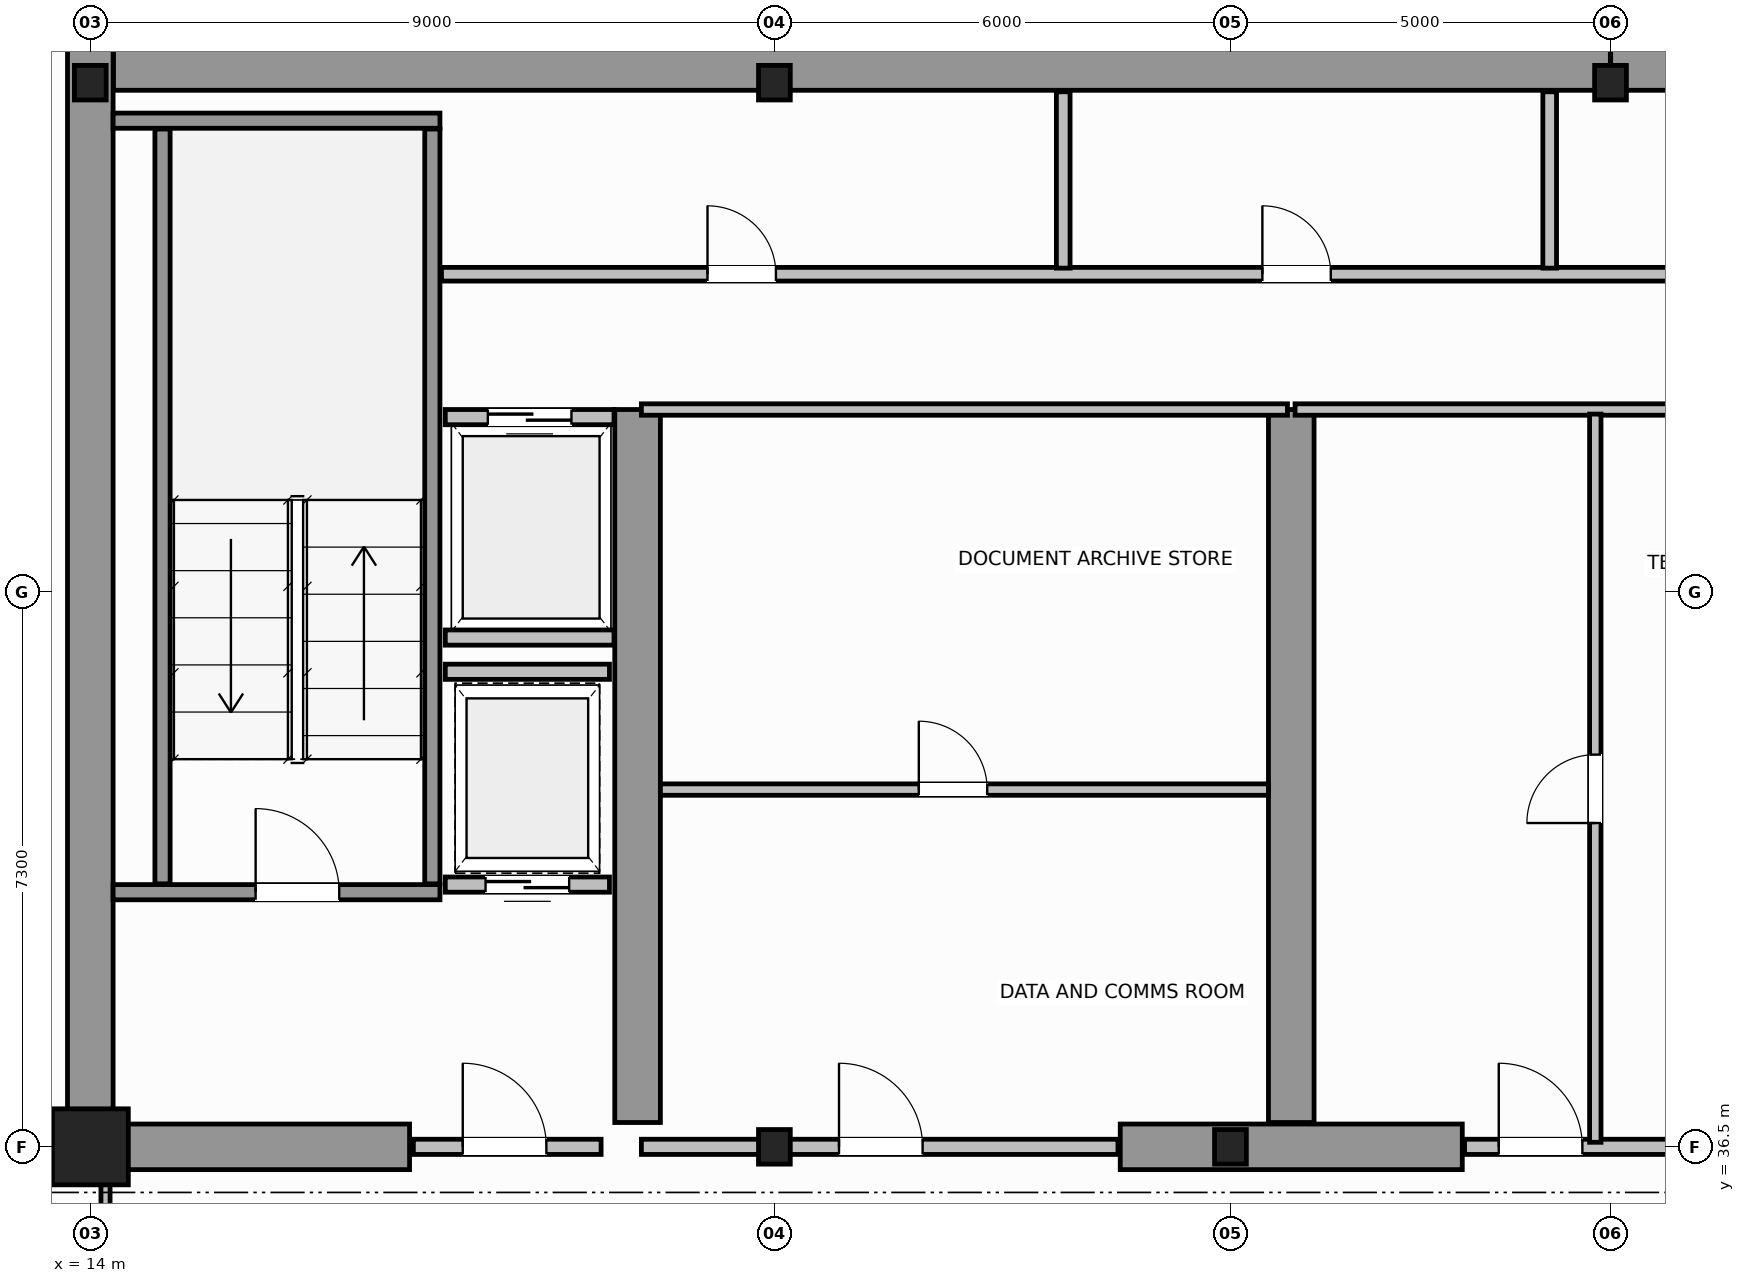
"""IFC4 building model, lengths in metres.
Left out: names, types, materials, properties, quantities, classifications, styles, units other than length and angle.
Written with IfcOpenShell. Run it as: python <this file> out.ifc"""

import sys

from ifc_helpers import new_model, si_unit, direction, frame, frame_2d, origin, origin_2d, place, context, subcontext, project, spatial, rectangle, i_section, extrude, source, transform, mapped, element, fill, save


model = new_model("IFC4")
c1 = context("Model", 3, precision=1e-05, world=origin(), true_north=direction((0.0, 1.0)))
c2 = subcontext(c1, "Body", "Model", "MODEL_VIEW")
j1 = project(units=[si_unit("LENGTHUNIT", "METRE"), si_unit("PLANEANGLEUNIT", "RADIAN")], contexts=[c1])
p1 = place(None, origin())
s1 = spatial("IfcSite", under=j1, at=p1, CompositionType="ELEMENT")
p2 = place(p1, origin())
s2 = spatial("IfcBuilding", under=s1, at=p2, CompositionType="ELEMENT")
p3 = place(p2, frame((0.0, 0.0, 227.0)))
s3 = spatial("IfcBuildingStorey", under=s2, at=p3, CompositionType="ELEMENT", Elevation=227.0)
m1 = source(origin(), c2, "Body", "SweptSolid", [
    extrude(rectangle(XDim=1.0, YDim=1.0, at=origin_2d()), origin(), (0.0, 0.0, 1.0), 3.8),
])
p4 = place(p3, frame((14.0, 36.5, 0.0), z_axis=(0.0, 0.0, 1.0), x_axis=(1.0, 0.0, 0.0)))
e1 = element("IfcColumn", 1, at=p4, inside=s3, PredefinedType="COLUMN", context=c2, shape_type="MappedRepresentation", body=[
    mapped(m1, transform((0.0, 0.0, 0.0), scale=1.0)),
])
m2 = source(origin(), c2, "Body", "SweptSolid", [
    extrude(i_section(OverallWidth=0.418, OverallDepth=0.455, WebThickness=0.042, FlangeThickness=0.058, FilletRadius=0.015, at=origin_2d()), origin(), (0.0, 0.0, 1.0), 3.8),
])
for number, where, z_axis, x_axis in (
    (2, (23.0, 36.5, 0.0), (0.0, 0.0, 1.0), (1.0, 0.0, 0.0)),
    (3, (29.0, 36.5, 0.0), (0.0, 0.0, 1.0), (1.0, 0.0, 0.0)),
    (4, (14.0, 50.5, 0.0), (0.0, 0.0, 1.0), (1.0, 0.0, 0.0)),
    (5, (23.0, 50.5, 0.0), (0.0, 0.0, 1.0), (1.0, 0.0, 0.0)),
    (6, (34.0, 50.5, 0.0), (0.0, 0.0, 1.0), (1.0, 0.0, 0.0)),
):
    element("IfcColumn", number, at=place(p3, frame(where, z_axis=z_axis, x_axis=x_axis)), inside=s3, PredefinedType="COLUMN", context=c2, shape_type="MappedRepresentation", body=[
        mapped(m2, transform((0.0, 0.0, 0.0), scale=1.0)),
    ])
for number, where, z_axis, x_axis in (
    (7, (14.304, 50.7, 0.0), (0.0, 0.0, 1.0), (1.0, 0.0, 0.0)),
    (8, (34.002, 50.7, 0.0), (0.0, 0.0, 1.0), (1.0, 0.0, 0.0)),
):
    element("IfcWall", number, at=place(p3, frame(where, z_axis=z_axis, x_axis=x_axis)), inside=s3, PredefinedType="SHEAR", context=c2, shape_type="SweptSolid", body=[
        extrude(rectangle(XDim=19.694, YDim=0.6, at=frame_2d((9.847, 0.0))), origin(), (0.0, 0.0, 1.0), 3.8),
    ])
p5 = place(p3, frame((14.0, 36.5, 0.0), z_axis=(0.0, 0.0, 1.0), x_axis=(0.0, 1.0, 0.0)))
e9 = element("IfcWall", 9, at=p5, inside=s3, PredefinedType="SHEAR", context=c2, shape_type="SweptSolid", body=[
    extrude(rectangle(XDim=14.5, YDim=0.6, at=frame_2d((7.25, 0.0))), origin(), (0.0, 0.0, 1.0), 3.8),
])
p6 = place(p3, frame((14.32, 36.5, 0.0), z_axis=(0.0, 0.0, 1.0), x_axis=(1.0, 0.0, 0.0)))
e10 = element("IfcWall", 10, at=p6, inside=s3, PredefinedType="SHEAR", context=c2, shape_type="SweptSolid", body=[
    extrude(rectangle(XDim=3.88, YDim=0.6, at=frame_2d((1.94, 0.0))), origin(), (0.0, 0.0, 1.0), 2.58),
])
p7 = place(p3, frame((27.55, 36.5, 0.0), z_axis=(0.0, 0.0, 1.0), x_axis=(1.0, 0.0, 0.0)))
e11 = element("IfcWall", 11, at=p7, inside=s3, PredefinedType="SHEAR", context=c2, shape_type="SweptSolid", body=[
    extrude(rectangle(XDim=4.5, YDim=0.6, at=frame_2d((2.25, 0.0))), origin(), (0.0, 0.0, 1.0), 3.8),
])
for number, where, z_axis, x_axis in (
    (12, (21.2, 36.82, 0.0), (0.0, 0.0, 1.0), (0.0, 1.0, 0.0)),
    (13, (29.8, 36.82, 0.0), (0.0, 0.0, 1.0), (0.0, 1.0, 0.0)),
):
    element("IfcWall", number, at=place(p3, frame(where, z_axis=z_axis, x_axis=x_axis)), inside=s3, PredefinedType="SHEAR", context=c2, shape_type="SweptSolid", body=[
        extrude(rectangle(XDim=9.38, YDim=0.6, at=frame_2d((4.69, 0.0))), origin(), (0.0, 0.0, 1.0), 3.8),
    ])
p8 = place(p3, frame((14.3, 39.85, 0.0), z_axis=(0.0, 0.0, 1.0), x_axis=(1.0, 0.0, 0.0)))
e14 = element("IfcWall", 14, at=p8, inside=s3, PredefinedType="SOLIDWALL", context=c2, shape_type="SweptSolid", body=[
    extrude(rectangle(XDim=4.3, YDim=0.2, at=frame_2d((2.15, 0.0))), origin(), (0.0, 0.0, 1.0), 3.8),
])
p9 = place(p8, frame((1.875, 0.0, 0.0)))
e15 = element("IfcOpeningElement", 15, at=p9, cuts=e14, PredefinedType="OPENING", context=c2, shape_type="SweptSolid", body=[
    extrude(rectangle(XDim=1.1, YDim=2.15, at=frame_2d((0.55, 1.075))), frame((0.0, 0.11, 0.0), z_axis=(0.0, -1.0, 0.0), x_axis=(1.0, 0.0, 0.0)), (0.0, 0.0, 1.0), 0.22),
])
p10 = place(p3, frame((14.3, 50.0, 0.0), z_axis=(0.0, 0.0, 1.0), x_axis=(1.0, 0.0, 0.0)))
e16 = element("IfcWall", 16, at=p10, inside=s3, PredefinedType="SOLIDWALL", context=c2, shape_type="SweptSolid", body=[
    extrude(rectangle(XDim=4.3, YDim=0.2, at=frame_2d((2.15, 0.0))), origin(), (0.0, 0.0, 1.0), 3.8),
])
for number, where, z_axis, x_axis in (
    (17, (14.95, 39.96, 0.0), (0.0, 0.0, 1.0), (0.0, 1.0, 0.0)),
    (18, (18.5, 39.96, 0.0), (0.0, 0.0, 1.0), (0.0, 1.0, 0.0)),
):
    element("IfcWall", number, at=place(p3, frame(where, z_axis=z_axis, x_axis=x_axis)), inside=s3, PredefinedType="SOLIDWALL", context=c2, shape_type="SweptSolid", body=[
        extrude(rectangle(XDim=9.93, YDim=0.2, at=frame_2d((4.965, 0.0))), origin(), (0.0, 0.0, 1.0), 3.8),
    ])
p11 = place(p3, frame((18.25, 36.5, 0.0), z_axis=(0.0, 0.0, 1.0), x_axis=(1.0, 0.0, 0.0)))
e19 = element("IfcWall", 19, at=p11, inside=s3, PredefinedType="SOLIDWALL", context=c2, shape_type="SweptSolid", body=[
    extrude(rectangle(XDim=2.47, YDim=0.2, at=frame_2d((1.235, 0.0))), origin(), (0.0, 0.0, 1.0), 2.57),
])
p12 = place(p11, frame((0.65, 0.0, 0.0)))
e20 = element("IfcOpeningElement", 20, at=p12, cuts=e19, PredefinedType="OPENING", context=c2, shape_type="SweptSolid", body=[
    extrude(rectangle(XDim=1.1, YDim=2.15, at=frame_2d((0.55, 1.075))), frame((0.0, 0.11, 0.0), z_axis=(0.0, -1.0, 0.0), x_axis=(1.0, 0.0, 0.0)), (0.0, 0.0, 1.0), 0.22),
])
p13 = place(p3, frame((18.67, 46.1, 0.0), z_axis=(0.0, 0.0, 1.0), x_axis=(1.0, 0.0, 0.0)))
e21 = element("IfcWall", 21, at=p13, inside=s3, PredefinedType="SOLIDWALL", context=c2, shape_type="SweptSolid", body=[
    extrude(rectangle(XDim=2.22, YDim=0.2, at=frame_2d((1.11, 0.0))), origin(), (0.0, 0.0, 1.0), 3.58),
])
p14 = place(p13, frame((0.56, 0.0, 0.0)))
e22 = element("IfcOpeningElement", 22, at=p14, cuts=e21, PredefinedType="OPENING", context=c2, shape_type="SweptSolid", body=[
    extrude(rectangle(XDim=1.1, YDim=2.15, at=frame_2d((0.55, 1.075))), frame((0.0, 0.11, 0.0), z_axis=(0.0, -1.0, 0.0), x_axis=(1.0, 0.0, 0.0)), (0.0, 0.0, 1.0), 0.22),
])
p15 = place(p3, frame((18.67, 43.2, 0.0), z_axis=(0.0, 0.0, 1.0), x_axis=(1.0, 0.0, 0.0)))
e23 = element("IfcWall", 23, at=p15, inside=s3, PredefinedType="SOLIDWALL", context=c2, shape_type="SweptSolid", body=[
    extrude(rectangle(XDim=2.22, YDim=0.2, at=frame_2d((1.11, 0.0))), origin(), (0.0, 0.0, 1.0), 3.58),
])
p16 = place(p3, frame((18.67, 39.95, 0.0), z_axis=(0.0, 0.0, 1.0), x_axis=(1.0, 0.0, 0.0)))
e24 = element("IfcWall", 24, at=p16, inside=s3, PredefinedType="SOLIDWALL", context=c2, shape_type="SweptSolid", body=[
    extrude(rectangle(XDim=2.16, YDim=0.2, at=frame_2d((1.08, 0.0))), origin(), (0.0, 0.0, 1.0), 3.58),
])
p17 = place(p16, frame((0.53, 0.0, 0.0)))
e25 = element("IfcOpeningElement", 25, at=p17, cuts=e24, PredefinedType="OPENING", context=c2, shape_type="SweptSolid", body=[
    extrude(rectangle(XDim=1.1, YDim=2.15, at=frame_2d((0.55, 1.075))), frame((0.0, 0.11, 0.0), z_axis=(0.0, -1.0, 0.0), x_axis=(1.0, 0.0, 0.0)), (0.0, 0.0, 1.0), 0.22),
])
p18 = place(p3, frame((18.67, 42.75, 0.0), z_axis=(0.0, 0.0, 1.0), x_axis=(1.0, 0.0, 0.0)))
e26 = element("IfcWall", 26, at=p18, inside=s3, PredefinedType="SOLIDWALL", context=c2, shape_type="SweptSolid", body=[
    extrude(rectangle(XDim=2.16, YDim=0.2, at=frame_2d((1.08, 0.0))), origin(), (0.0, 0.0, 1.0), 3.58),
])
p19 = place(p3, frame((21.25, 36.5, 0.0), z_axis=(0.0, 0.0, 1.0), x_axis=(1.0, 0.0, 0.0)))
e27 = element("IfcWall", 27, at=p19, inside=s3, PredefinedType="SOLIDWALL", context=c2, shape_type="SweptSolid", body=[
    extrude(rectangle(XDim=6.27, YDim=0.2, at=frame_2d((3.135, 0.0))), origin(), (0.0, 0.0, 1.0), 2.57),
])
p20 = place(p19, frame((2.6, 0.0, 0.0)))
e28 = element("IfcOpeningElement", 28, at=p20, cuts=e27, PredefinedType="OPENING", context=c2, shape_type="SweptSolid", body=[
    extrude(rectangle(XDim=1.1, YDim=2.15, at=frame_2d((0.55, 1.075))), frame((0.0, 0.11, 0.0), z_axis=(0.0, -1.0, 0.0), x_axis=(1.0, 0.0, 0.0)), (0.0, 0.0, 1.0), 0.22),
])
p21 = place(p3, frame((21.25, 46.2, 0.0), z_axis=(0.0, 0.0, 1.0), x_axis=(1.0, 0.0, 0.0)))
e29 = element("IfcWall", 29, at=p21, inside=s3, PredefinedType="PARTITIONING", context=c2, shape_type="SweptSolid", body=[
    extrude(rectangle(XDim=8.5, YDim=0.15, at=frame_2d((4.25, 0.0))), origin(), (0.0, 0.0, 1.0), 3.58),
])
p22 = place(p3, frame((21.5, 41.2, 0.0), z_axis=(0.0, 0.0, 1.0), x_axis=(1.0, 0.0, 0.0)))
e30 = element("IfcWall", 30, at=p22, inside=s3, PredefinedType="PARTITIONING", context=c2, shape_type="SweptSolid", body=[
    extrude(rectangle(XDim=8.0, YDim=0.15, at=frame_2d((4.0, 0.0))), origin(), (0.0, 0.0, 1.0), 3.58),
])
p23 = place(p22, frame((3.4, 0.0, 0.0)))
e31 = element("IfcOpeningElement", 31, at=p23, cuts=e30, PredefinedType="OPENING", context=c2, shape_type="SweptSolid", body=[
    extrude(rectangle(XDim=0.9, YDim=2.1, at=frame_2d((0.45, 1.05))), frame((0.0, 0.085, 0.0), z_axis=(0.0, -1.0, 0.0), x_axis=(1.0, 0.0, 0.0)), (0.0, 0.0, 1.0), 0.17),
])
p24 = place(p3, frame((32.08, 36.5, 0.0), z_axis=(0.0, 0.0, 1.0), x_axis=(1.0, 0.0, 0.0)))
e32 = element("IfcWall", 32, at=p24, inside=s3, PredefinedType="SOLIDWALL", context=c2, shape_type="SweptSolid", body=[
    extrude(rectangle(XDim=4.04, YDim=0.2, at=frame_2d((2.02, 0.0))), origin(), (0.0, 0.0, 1.0), 3.02),
])
p25 = place(p24, frame((0.45, 0.0, 0.0)))
e33 = element("IfcOpeningElement", 33, at=p25, cuts=e32, PredefinedType="OPENING", context=c2, shape_type="SweptSolid", body=[
    extrude(rectangle(XDim=1.1, YDim=2.15, at=frame_2d((0.55, 1.075))), frame((0.0, 0.11, 0.0), z_axis=(0.0, -1.0, 0.0), x_axis=(1.0, 0.0, 0.0)), (0.0, 0.0, 1.0), 0.22),
])
p26 = place(p3, frame((29.85, 46.2, 0.0), z_axis=(0.0, 0.0, 1.0), x_axis=(1.0, 0.0, 0.0)))
e34 = element("IfcWall", 34, at=p26, inside=s3, PredefinedType="PARTITIONING", context=c2, shape_type="SweptSolid", body=[
    extrude(rectangle(XDim=8.5, YDim=0.15, at=frame_2d((4.25, 0.0))), origin(), (0.0, 0.0, 1.0), 3.58),
])
p27 = place(p3, frame((33.8, 36.56, 0.0), z_axis=(0.0, 0.0, 1.0), x_axis=(0.0, 1.0, 0.0)))
e35 = element("IfcWall", 35, at=p27, inside=s3, PredefinedType="PARTITIONING", context=c2, shape_type="SweptSolid", body=[
    extrude(rectangle(XDim=9.58, YDim=0.15, at=frame_2d((4.79, 0.0))), origin(), (0.0, 0.0, 1.0), 3.58),
])
p28 = place(p27, frame((4.2, 0.0, 0.0)))
e36 = element("IfcOpeningElement", 36, at=p28, cuts=e35, PredefinedType="OPENING", context=c2, shape_type="SweptSolid", body=[
    extrude(rectangle(XDim=0.9, YDim=2.1, at=frame_2d((0.45, 1.05))), frame((0.0, 0.085, 0.0), z_axis=(0.0, -1.0, 0.0), x_axis=(1.0, 0.0, 0.0)), (0.0, 0.0, 1.0), 0.17),
])
p29 = place(p3, frame((18.62, 47.98, 0.0), z_axis=(0.0, 0.0, 1.0), x_axis=(1.0, 0.0, 0.0)))
e37 = element("IfcWall", 37, at=p29, inside=s3, PredefinedType="PLUMBINGWALL", context=c2, shape_type="SweptSolid", body=[
    extrude(rectangle(XDim=20.06, YDim=0.18, at=frame_2d((10.03, 0.0))), origin(), (0.0, 0.0, 1.0), 3.58),
])
p30 = place(p29, frame((3.5, 0.0, 0.0)))
e38 = element("IfcOpeningElement", 38, at=p30, cuts=e37, PredefinedType="OPENING", context=c2, shape_type="SweptSolid", body=[
    extrude(rectangle(XDim=0.9, YDim=2.15, at=frame_2d((0.45, 1.075))), frame((0.0, 0.1, 0.0), z_axis=(0.0, -1.0, 0.0), x_axis=(1.0, 0.0, 0.0)), (0.0, 0.0, 1.0), 0.2),
])
p31 = place(p29, frame((10.8, 0.0, 0.0)))
e39 = element("IfcOpeningElement", 39, at=p31, cuts=e37, PredefinedType="OPENING", context=c2, shape_type="SweptSolid", body=[
    extrude(rectangle(XDim=0.9, YDim=2.15, at=frame_2d((0.45, 1.075))), frame((0.0, 0.1, 0.0), z_axis=(0.0, -1.0, 0.0), x_axis=(1.0, 0.0, 0.0)), (0.0, 0.0, 1.0), 0.2),
])
p32 = place(p29, frame((16.8, 0.0, 0.0)))
e40 = element("IfcOpeningElement", 40, at=p32, cuts=e37, PredefinedType="OPENING", context=c2, shape_type="SweptSolid", body=[
    extrude(rectangle(XDim=0.9, YDim=2.15, at=frame_2d((0.45, 1.075))), frame((0.0, 0.1, 0.0), z_axis=(0.0, -1.0, 0.0), x_axis=(1.0, 0.0, 0.0)), (0.0, 0.0, 1.0), 0.2),
])
for number, where, z_axis, x_axis in (
    (41, (26.8, 48.06, 0.0), (0.0, 0.0, 1.0), (0.0, 1.0, 0.0)),
    (42, (33.2, 48.06, 0.0), (0.0, 0.0, 1.0), (0.0, 1.0, 0.0)),
):
    element("IfcWall", number, at=place(p3, frame(where, z_axis=z_axis, x_axis=x_axis)), inside=s3, PredefinedType="PLUMBINGWALL", context=c2, shape_type="SweptSolid", body=[
        extrude(rectangle(XDim=2.32, YDim=0.18, at=frame_2d((1.16, 0.0))), origin(), (0.0, 0.0, 1.0), 3.58),
    ])
p33 = place(p3, frame((14.2, 34.0, 0.0), z_axis=(0.0, 0.0, 1.0), x_axis=(0.0, 1.0, 0.0)))
e43 = element("IfcWall", 43, at=p33, inside=s3, PredefinedType="PARTITIONING", context=c2, shape_type="SweptSolid", body=[
    extrude(rectangle(XDim=2.44, YDim=0.12, at=frame_2d((1.22, 0.0))), origin(), (0.0, 0.0, 1.0), 3.58),
])
p34 = place(p33, frame((0.7, 0.0, 0.0)))
e44 = element("IfcOpeningElement", 44, at=p34, cuts=e43, PredefinedType="OPENING", context=c2, shape_type="SweptSolid", body=[
    extrude(rectangle(XDim=0.9, YDim=2.15, at=frame_2d((0.45, 1.075))), frame((0.0, 0.07, 0.0), z_axis=(0.0, -1.0, 0.0), x_axis=(1.0, 0.0, 0.0)), (0.0, 0.0, 1.0), 0.14),
])
m3 = source(origin(), c2, "Body", "SweptSolid", [
    extrude(rectangle(XDim=1.1, YDim=2.15, at=frame_2d((0.55, 1.075))), frame((0.0, 0.025, 0.0), z_axis=(0.0, -1.0, 0.0), x_axis=(1.0, 0.0, 0.0)), (0.0, 0.0, 1.0), 0.05),
])
p35 = place(p9, origin())
e45 = element("IfcDoor", 45, at=p35, inside=s3, OperationType="SINGLE_SWING_LEFT", PredefinedType="DOOR", context=c2, shape_type="MappedRepresentation", body=[
    mapped(m3, transform((0.0, 0.0, 0.0), scale=1.0)),
])
fill(e15, e45)
p36 = place(p12, origin())
e46 = element("IfcDoor", 46, at=p36, inside=s3, OperationType="SINGLE_SWING_RIGHT", PredefinedType="DOOR", context=c2, shape_type="MappedRepresentation", body=[
    mapped(m3, transform((0.0, 0.0, 0.0), scale=1.0)),
])
fill(e20, e46)
p37 = place(p14, origin())
e47 = element("IfcDoor", 47, at=p37, inside=s3, OperationType="DOUBLE_DOOR_SLIDING", PredefinedType="DOOR", context=c2, shape_type="MappedRepresentation", body=[
    mapped(m3, transform((0.0, 0.0, 0.0), scale=1.0)),
])
fill(e22, e47)
p38 = place(p17, origin())
e48 = element("IfcDoor", 48, at=p38, inside=s3, OperationType="DOUBLE_DOOR_SLIDING", PredefinedType="DOOR", context=c2, shape_type="MappedRepresentation", body=[
    mapped(m3, transform((0.0, 0.0, 0.0), scale=1.0)),
])
fill(e25, e48)
p39 = place(p20, origin())
e49 = element("IfcDoor", 49, at=p39, inside=s3, OperationType="SINGLE_SWING_LEFT", PredefinedType="DOOR", context=c2, shape_type="MappedRepresentation", body=[
    mapped(m3, transform((0.0, 0.0, 0.0), scale=1.0)),
])
fill(e28, e49)
m4 = source(origin(), c2, "Body", "SweptSolid", [
    extrude(rectangle(XDim=0.9, YDim=2.1, at=frame_2d((0.45, 1.05))), frame((0.0, 0.025, 0.0), z_axis=(0.0, -1.0, 0.0), x_axis=(1.0, 0.0, 0.0)), (0.0, 0.0, 1.0), 0.05),
])
p40 = place(p23, origin())
e50 = element("IfcDoor", 50, at=p40, inside=s3, OperationType="SINGLE_SWING_RIGHT", PredefinedType="DOOR", context=c2, shape_type="MappedRepresentation", body=[
    mapped(m4, transform((0.0, 0.0, 0.0), scale=1.0)),
])
fill(e31, e50)
p41 = place(p25, origin())
e51 = element("IfcDoor", 51, at=p41, inside=s3, OperationType="SINGLE_SWING_LEFT", PredefinedType="DOOR", context=c2, shape_type="MappedRepresentation", body=[
    mapped(m3, transform((0.0, 0.0, 0.0), scale=1.0)),
])
fill(e33, e51)
p42 = place(p28, origin())
e52 = element("IfcDoor", 52, at=p42, inside=s3, OperationType="SINGLE_SWING_RIGHT", PredefinedType="DOOR", context=c2, shape_type="MappedRepresentation", body=[
    mapped(m4, transform((0.0, 0.0, 0.0), scale=1.0)),
])
fill(e36, e52)
m5 = source(origin(), c2, "Body", "SweptSolid", [
    extrude(rectangle(XDim=0.9, YDim=2.15, at=frame_2d((0.45, 1.075))), frame((0.0, 0.025, 0.0), z_axis=(0.0, -1.0, 0.0), x_axis=(1.0, 0.0, 0.0)), (0.0, 0.0, 1.0), 0.05),
])
p43 = place(p30, origin())
e53 = element("IfcDoor", 53, at=p43, inside=s3, OperationType="SINGLE_SWING_LEFT", PredefinedType="DOOR", context=c2, shape_type="MappedRepresentation", body=[
    mapped(m5, transform((0.0, 0.0, 0.0), scale=1.0)),
])
fill(e38, e53)
p44 = place(p31, origin())
e54 = element("IfcDoor", 54, at=p44, inside=s3, OperationType="SINGLE_SWING_RIGHT", PredefinedType="DOOR", context=c2, shape_type="MappedRepresentation", body=[
    mapped(m5, transform((0.0, 0.0, 0.0), scale=1.0)),
])
fill(e39, e54)
save(model, sys.argv[1])
